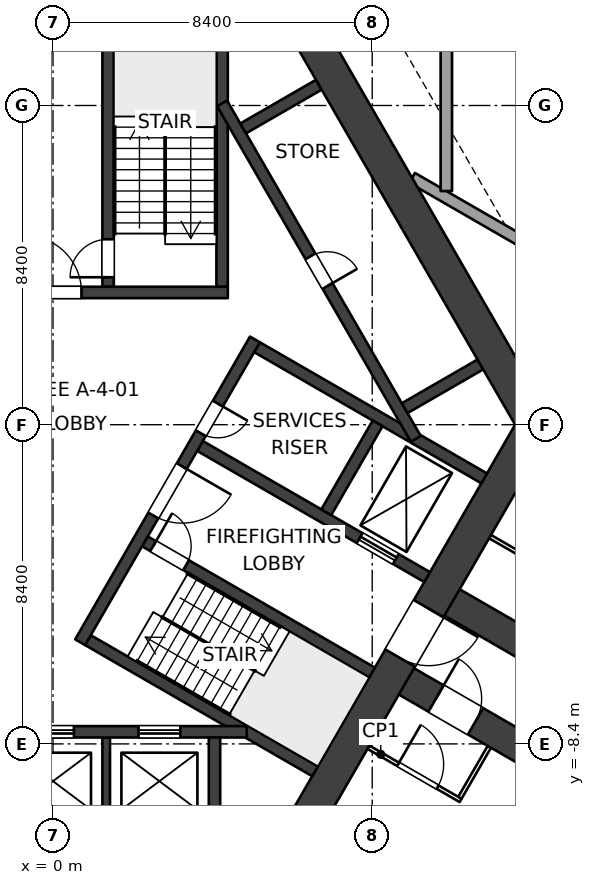
"""IFC4 building model, lengths in metres.
Left out: names, types, materials, properties, quantities, classifications, styles, units other than length and angle.
Written with IfcOpenShell. Run it as: python <this file> out.ifc"""

import sys

from ifc_helpers import new_model, si_unit, direction, frame, frame_2d, origin, place, context, subcontext, project, spatial, polyline, rectangle, outline, extrude, element, fill, save


model = new_model("IFC4")
c1 = context("Model", 3, precision=1e-05, world=origin(), true_north=direction((0.0, 1.0)))
c2 = subcontext(c1, "Body", "Model", "MODEL_VIEW")
j1 = project(units=[si_unit("LENGTHUNIT", "METRE"), si_unit("PLANEANGLEUNIT", "RADIAN")], contexts=[c1])
p1 = place(None, origin())
s1 = spatial("IfcSite", under=j1, at=p1, CompositionType="ELEMENT")
p2 = place(p1, origin())
s2 = spatial("IfcBuilding", under=s1, at=p2, CompositionType="ELEMENT")
p3 = place(p2, frame((0.0, 0.0, -10.5)))
s3 = spatial("IfcBuildingStorey", under=s2, at=p3, CompositionType="ELEMENT", Elevation=-10.5)
p4 = place(p3, frame((12.551, -0.225, 0.0), z_axis=(0.0, 0.0, 1.0), x_axis=(-0.499997612506, -0.8660267822, 0.0)))
e1 = element("IfcWall", 1, at=p4, inside=s3, PredefinedType="SHEAR", context=c2, shape_type="SweptSolid", body=[
    extrude(rectangle(XDim=12.161, YDim=0.9, at=frame_2d((6.08, 0.0))), origin(), (0.0, 0.0, 1.0), 3.5),
])
p5 = place(p4, frame((5.33, 0.0, 0.0)))
e2 = element("IfcOpeningElement", 2, at=p5, cuts=e1, PredefinedType="OPENING", context=c2, shape_type="SweptSolid", body=[
    extrude(rectangle(XDim=1.5, YDim=2.1, at=frame_2d((0.75, 1.05))), frame((0.0, 0.46, 0.0), z_axis=(0.0, -1.0, 0.0), x_axis=(1.0, 0.0, 0.0)), (0.0, 0.0, 1.0), 0.92),
])
p6 = place(p3, origin())
e3 = element("IfcWall", 3, at=p6, inside=s3, PredefinedType="SHEAR", context=c2, shape_type="SweptSolid", body=[
    extrude(outline(polyline([(13.2, 0.0), (6.6, 11.432), (6.08, 11.432), (6.08, 10.531), (12.161, 0.0), (12.94, -0.45), (13.2, 0.0)])), origin(), (0.0, 0.0, 1.0), 3.5),
])
p7 = place(p3, frame((-4.6, 3.48, 0.0), z_axis=(0.0, 0.0, 1.0), x_axis=(1.0, 0.0, 0.0)))
e4 = element("IfcWall", 4, at=p7, inside=s3, PredefinedType="SHEAR", context=c2, shape_type="SweptSolid", body=[
    extrude(rectangle(XDim=9.2, YDim=0.3, at=frame_2d((4.6, 0.0))), origin(), (0.0, 0.0, 1.0), 3.5),
])
p8 = place(p7, frame((3.85, 0.0, 0.0)))
e5 = element("IfcOpeningElement", 5, at=p8, cuts=e4, PredefinedType="OPENING", context=c2, shape_type="SweptSolid", body=[
    extrude(rectangle(XDim=1.5, YDim=2.1, at=frame_2d((0.75, 1.05))), frame((0.0, 0.16, 0.0), z_axis=(0.0, -1.0, 0.0), x_axis=(1.0, 0.0, 0.0)), (0.0, 0.0, 1.0), 0.32),
])
p9 = place(p7, frame((1.95, 0.0, 0.0)))
e6 = element("IfcOpeningElement", 6, at=p9, cuts=e4, PredefinedType="OPENING", context=c2, shape_type="SweptSolid", body=[
    extrude(rectangle(XDim=0.9, YDim=2.1, at=frame_2d((0.45, 1.05))), frame((0.0, 0.16, 0.0), z_axis=(0.0, -1.0, 0.0), x_axis=(1.0, 0.0, 0.0)), (0.0, 0.0, 1.0), 0.32),
])
p10 = place(p3, frame((1.45, 3.63, 0.0), z_axis=(0.0, 0.0, 1.0), x_axis=(0.0, 1.0, 0.0)))
e7 = element("IfcWall", 7, at=p10, inside=s3, PredefinedType="SHEAR", context=c2, shape_type="SweptSolid", body=[
    extrude(rectangle(XDim=6.902, YDim=0.3, at=frame_2d((3.451, 0.0))), origin(), (0.0, 0.0, 1.0), 3.5),
])
p11 = place(p10, frame((0.25, 0.0, 0.0)))
e8 = element("IfcOpeningElement", 8, at=p11, cuts=e7, PredefinedType="OPENING", context=c2, shape_type="SweptSolid", body=[
    extrude(rectangle(XDim=1.0, YDim=2.1, at=frame_2d((0.5, 1.05))), frame((0.0, 0.16, 0.0), z_axis=(0.0, -1.0, 0.0), x_axis=(1.0, 0.0, 0.0)), (0.0, 0.0, 1.0), 0.32),
])
p12 = place(p3, frame((4.45, 3.63, 0.0), z_axis=(0.0, 0.0, 1.0), x_axis=(0.0, 1.0, 0.0)))
e9 = element("IfcWall", 9, at=p12, inside=s3, PredefinedType="SHEAR", context=c2, shape_type="SweptSolid", body=[
    extrude(rectangle(XDim=6.902, YDim=0.3, at=frame_2d((3.451, 0.0))), origin(), (0.0, 0.0, 1.0), 3.5),
])
p13 = place(p3, frame((5.314, 2.244, 0.0), z_axis=(0.0, 0.0, 1.0), x_axis=(-0.499995050369, -0.866028261437, 0.0)))
e10 = element("IfcWall", 10, at=p13, inside=s3, PredefinedType="SHEAR", context=c2, shape_type="SweptSolid", body=[
    extrude(rectangle(XDim=9.2, YDim=0.3, at=frame_2d((4.6, 0.0))), origin(), (0.0, 0.0, 1.0), 3.5),
])
p14 = place(p13, frame((3.85, 0.0, 0.0)))
e11 = element("IfcOpeningElement", 11, at=p14, cuts=e10, PredefinedType="OPENING", context=c2, shape_type="SweptSolid", body=[
    extrude(rectangle(XDim=1.5, YDim=2.1, at=frame_2d((0.75, 1.05))), frame((0.0, 0.16, 0.0), z_axis=(0.0, -1.0, 0.0), x_axis=(1.0, 0.0, 0.0)), (0.0, 0.0, 1.0), 0.32),
])
p15 = place(p13, frame((1.95, 0.0, 0.0)))
e12 = element("IfcOpeningElement", 12, at=p15, cuts=e10, PredefinedType="OPENING", context=c2, shape_type="SweptSolid", body=[
    extrude(rectangle(XDim=0.9, YDim=2.1, at=frame_2d((0.45, 1.05))), frame((0.0, 0.16, 0.0), z_axis=(0.0, -1.0, 0.0), x_axis=(1.0, 0.0, 0.0)), (0.0, 0.0, 1.0), 0.32),
])
p16 = place(p3, frame((2.419, -3.071, 0.0), z_axis=(0.0, 0.0, 1.0), x_axis=(0.86602711848, -0.499997030048, 0.0)))
e13 = element("IfcWall", 13, at=p16, inside=s3, PredefinedType="SHEAR", context=c2, shape_type="SweptSolid", body=[
    extrude(rectangle(XDim=6.901, YDim=0.3, at=frame_2d((3.451, 0.0))), origin(), (0.0, 0.0, 1.0), 3.5),
])
p17 = place(p16, frame((0.25, 0.0, 0.0)))
e14 = element("IfcOpeningElement", 14, at=p17, cuts=e13, PredefinedType="OPENING", context=c2, shape_type="SweptSolid", body=[
    extrude(rectangle(XDim=1.0, YDim=2.1, at=frame_2d((0.5, 1.05))), frame((0.0, 0.16, 0.0), z_axis=(0.0, -1.0, 0.0), x_axis=(1.0, 0.0, 0.0)), (0.0, 0.0, 1.0), 0.32),
])
p18 = place(p3, frame((0.919, -5.669, 0.0), z_axis=(0.0, 0.0, 1.0), x_axis=(0.866011800373, -0.500023561059, 0.0)))
e15 = element("IfcWall", 15, at=p18, inside=s3, PredefinedType="SHEAR", context=c2, shape_type="SweptSolid", body=[
    extrude(rectangle(XDim=6.902, YDim=0.3, at=frame_2d((3.451, 0.0))), origin(), (0.0, 0.0, 1.0), 3.5),
])
p19 = place(p3, frame((3.869, -0.559, 0.0), z_axis=(0.0, 0.0, 1.0), x_axis=(0.86602711848, -0.499997030048, 0.0)))
e16 = element("IfcWall", 16, at=p19, inside=s3, PredefinedType="SHEAR", context=c2, shape_type="SweptSolid", body=[
    extrude(rectangle(XDim=6.901, YDim=0.3, at=frame_2d((3.451, 0.0))), origin(), (0.0, 0.0, 1.0), 3.5),
])
p20 = place(p19, frame((4.85, 0.0, 0.0)))
e17 = element("IfcOpeningElement", 17, at=p20, cuts=e16, PredefinedType="OPENING", context=c2, shape_type="SweptSolid", body=[
    extrude(rectangle(XDim=1.1, YDim=2.1, at=frame_2d((0.55, 1.05))), frame((0.0, 0.16, 0.0), z_axis=(0.0, -1.0, 0.0), x_axis=(1.0, 0.0, 0.0)), (0.0, 0.0, 1.0), 0.32),
])
p21 = place(p3, frame((5.369, 2.039, 0.0), z_axis=(0.0, 0.0, 1.0), x_axis=(0.86602711848, -0.499997030048, 0.0)))
e18 = element("IfcWall", 18, at=p21, inside=s3, PredefinedType="SHEAR", context=c2, shape_type="SweptSolid", body=[
    extrude(rectangle(XDim=6.901, YDim=0.3, at=frame_2d((3.451, 0.0))), origin(), (0.0, 0.0, 1.0), 3.5),
])
p22 = place(p3, frame((8.541, 0.034, 0.0), z_axis=(0.0, 0.0, 1.0), x_axis=(-0.50000943426, -0.866019956843, 0.0)))
e19 = element("IfcWall", 19, at=p22, inside=s3, PredefinedType="SHEAR", context=c2, shape_type="SweptSolid", body=[
    extrude(rectangle(XDim=2.7, YDim=0.3, at=frame_2d((1.35, 0.0))), origin(), (0.0, 0.0, 1.0), 3.5),
])
p23 = place(p3, frame((5.098, -8.082, 0.0), z_axis=(0.0, 0.0, 1.0), x_axis=(-1.0, 0.0, 0.0)))
e20 = element("IfcWall", 20, at=p23, inside=s3, PredefinedType="SHEAR", context=c2, shape_type="SweptSolid", body=[
    extrude(rectangle(XDim=10.195, YDim=0.3, at=frame_2d((5.098, 0.0))), origin(), (0.0, 0.0, 1.0), 3.5),
])
p24 = place(p23, frame((1.748, 0.0, 0.0)))
e21 = element("IfcOpeningElement", 21, at=p24, cuts=e20, PredefinedType="OPENING", context=c2, shape_type="SweptSolid", body=[
    extrude(rectangle(XDim=1.1, YDim=2.1, at=frame_2d((0.55, 1.05))), frame((0.0, 0.16, 0.0), z_axis=(0.0, -1.0, 0.0), x_axis=(1.0, 0.0, 0.0)), (0.0, 0.0, 1.0), 0.32),
])
p25 = place(p23, frame((4.548, 0.0, 0.0)))
e22 = element("IfcOpeningElement", 22, at=p25, cuts=e20, PredefinedType="OPENING", context=c2, shape_type="SweptSolid", body=[
    extrude(rectangle(XDim=1.1, YDim=2.1, at=frame_2d((0.55, 1.05))), frame((0.0, 0.16, 0.0), z_axis=(0.0, -1.0, 0.0), x_axis=(1.0, 0.0, 0.0)), (0.0, 0.0, 1.0), 0.32),
])
p26 = place(p23, frame((7.348, 0.0, 0.0)))
e23 = element("IfcOpeningElement", 23, at=p26, cuts=e20, PredefinedType="OPENING", context=c2, shape_type="SweptSolid", body=[
    extrude(rectangle(XDim=1.1, YDim=2.1, at=frame_2d((0.55, 1.05))), frame((0.0, 0.16, 0.0), z_axis=(0.0, -1.0, 0.0), x_axis=(1.0, 0.0, 0.0)), (0.0, 0.0, 1.0), 0.32),
])
p27 = place(p3, frame((4.25, -8.231, 0.0), z_axis=(0.0, 0.0, 1.0), x_axis=(0.0, -1.0, 0.0)))
e24 = element("IfcWall", 24, at=p27, inside=s3, PredefinedType="SHEAR", context=c2, shape_type="SweptSolid", body=[
    extrude(rectangle(XDim=2.3, YDim=0.3, at=frame_2d((1.15, 0.0))), origin(), (0.0, 0.0, 1.0), 3.5),
])
p28 = place(p3, frame((1.4, -8.231, 0.0), z_axis=(0.0, 0.0, 1.0), x_axis=(0.0, -1.0, 0.0)))
e25 = element("IfcWall", 25, at=p28, inside=s3, PredefinedType="SHEAR", context=c2, shape_type="SweptSolid", body=[
    extrude(rectangle(XDim=2.3, YDim=0.2, at=frame_2d((1.15, 0.0))), origin(), (0.0, 0.0, 1.0), 3.5),
])
p29 = place(p3, frame((4.45, 8.455, 0.0), z_axis=(0.0, 0.0, 1.0), x_axis=(0.500002290144, -0.866024081565, 0.0)))
e26 = element("IfcWall", 26, at=p29, inside=s3, PredefinedType="SHEAR", context=c2, shape_type="SweptSolid", body=[
    extrude(rectangle(XDim=10.195, YDim=0.3, at=frame_2d((5.098, 0.0))), origin(), (0.0, 0.0, 1.0), 3.5),
])
p30 = place(p29, frame((4.648, 0.0, 0.0)))
e27 = element("IfcOpeningElement", 27, at=p30, cuts=e26, PredefinedType="OPENING", context=c2, shape_type="SweptSolid", body=[
    extrude(rectangle(XDim=0.9, YDim=2.1, at=frame_2d((0.45, 1.05))), frame((0.0, 0.16, 0.0), z_axis=(0.0, -1.0, 0.0), x_axis=(1.0, 0.0, 0.0)), (0.0, 0.0, 1.0), 0.32),
])
for number, where, z_axis, x_axis in (
    (28, (5.004, 7.796, 0.0), (0.0, 0.0, 1.0), (0.866, 0.5, 0.0)),
    (29, (9.254, 0.435, 0.0), (0.0, 0.0, 1.0), (0.866, 0.5, 0.0)),
):
    element("IfcWall", number, at=place(p3, frame(where, z_axis=z_axis, x_axis=x_axis)), inside=s3, PredefinedType="SHEAR", context=c2, shape_type="SweptSolid", body=[
        extrude(rectangle(XDim=2.3, YDim=0.3, at=frame_2d((1.15, 0.0))), origin(), (0.0, 0.0, 1.0), 3.5),
    ])
p31 = place(p3, frame((10.11, -4.451, 0.0), z_axis=(0.0, 0.0, 1.0), x_axis=(0.866025284237, -0.500000207062, 0.0)))
e30 = element("IfcWall", 30, at=p31, inside=s3, PredefinedType="SHEAR", context=c2, shape_type="SweptSolid", body=[
    extrude(rectangle(XDim=36.75, YDim=0.8, at=frame_2d((18.375, 0.0))), origin(), (0.0, 0.0, 1.0), 3.5),
])
p32 = place(p31, frame((2.75, 0.0, 0.0)))
e31 = element("IfcOpeningElement", 31, at=p32, cuts=e30, PredefinedType="OPENING", context=c2, shape_type="SweptSolid", body=[
    extrude(rectangle(XDim=1.2, YDim=2.1, at=frame_2d((0.6, 1.05))), frame((0.0, 0.41, 0.0), z_axis=(0.0, -1.0, 0.0), x_axis=(1.0, 0.0, 0.0)), (0.0, 0.0, 1.0), 0.82),
])
p33 = place(p31, frame((7.35, 0.0, 0.0)))
e32 = element("IfcOpeningElement", 32, at=p33, cuts=e30, PredefinedType="OPENING", context=c2, shape_type="SweptSolid", body=[
    extrude(rectangle(XDim=1.2, YDim=2.1, at=frame_2d((0.6, 1.05))), frame((0.0, 0.41, 0.0), z_axis=(0.0, -1.0, 0.0), x_axis=(1.0, 0.0, 0.0)), (0.0, 0.0, 1.0), 0.82),
])
p34 = place(p3, frame((8.91, -6.53, 0.0), z_axis=(0.0, 0.0, 1.0), x_axis=(0.866025284237, -0.500000207062, 0.0)))
e33 = element("IfcWall", 33, at=p34, inside=s3, PredefinedType="SHEAR", context=c2, shape_type="SweptSolid", body=[
    extrude(rectangle(XDim=36.75, YDim=0.8, at=frame_2d((18.375, 0.0))), origin(), (0.0, 0.0, 1.0), 3.5),
])
p35 = place(p34, frame((1.35, 0.0, 0.0)))
e34 = element("IfcOpeningElement", 34, at=p35, cuts=e33, PredefinedType="OPENING", context=c2, shape_type="SweptSolid", body=[
    extrude(rectangle(XDim=1.2, YDim=2.1, at=frame_2d((0.6, 1.05))), frame((0.0, 0.41, 0.0), z_axis=(0.0, -1.0, 0.0), x_axis=(1.0, 0.0, 0.0)), (0.0, 0.0, 1.0), 0.82),
])
p36 = place(p3, frame((11.5, -2.945, 0.0), z_axis=(0.0, 0.0, 1.0), x_axis=(0.866045472092, -0.499965239061, 0.0)))
e35 = element("IfcWall", 35, at=p36, inside=s3, PredefinedType="PARTITIONING", context=c2, shape_type="SweptSolid", body=[
    extrude(rectangle(XDim=5.6, YDim=0.1, at=frame_2d((2.8, 0.0))), origin(), (0.0, 0.0, 1.0), 3.2),
])
p37 = place(p36, frame((1.125, 0.0, 0.0)))
e36 = element("IfcOpeningElement", 36, at=p37, cuts=e35, PredefinedType="OPENING", context=c2, shape_type="SweptSolid", body=[
    extrude(rectangle(XDim=0.9, YDim=2.1, at=frame_2d((0.45, 1.05))), frame((0.0, 0.06, 0.0), z_axis=(0.0, -1.0, 0.0), x_axis=(1.0, 0.0, 0.0)), (0.0, 0.0, 1.0), 0.12),
])
p38 = place(p36, frame((3.775, 0.0, 0.0)))
e37 = element("IfcOpeningElement", 37, at=p38, cuts=e35, PredefinedType="OPENING", context=c2, shape_type="SweptSolid", body=[
    extrude(rectangle(XDim=0.9, YDim=2.1, at=frame_2d((0.45, 1.05))), frame((0.0, 0.06, 0.0), z_axis=(0.0, -1.0, 0.0), x_axis=(1.0, 0.0, 0.0)), (0.0, 0.0, 1.0), 0.12),
])
p39 = place(p3, frame((8.3, -8.487, 0.0), z_axis=(0.0, 0.0, 1.0), x_axis=(0.866034573852, -0.49998411664, 0.0)))
e38 = element("IfcWall", 38, at=p39, inside=s3, PredefinedType="PARTITIONING", context=c2, shape_type="SweptSolid", body=[
    extrude(rectangle(XDim=2.8, YDim=0.1, at=frame_2d((1.4, 0.0))), origin(), (0.0, 0.0, 1.0), 3.2),
])
p40 = place(p39, frame((0.9, 0.0, 0.0)))
e39 = element("IfcOpeningElement", 39, at=p40, cuts=e38, PredefinedType="OPENING", context=c2, shape_type="SweptSolid", body=[
    extrude(rectangle(XDim=1.2, YDim=2.1, at=frame_2d((0.6, 1.05))), frame((0.0, 0.06, 0.0), z_axis=(0.0, -1.0, 0.0), x_axis=(1.0, 0.0, 0.0)), (0.0, 0.0, 1.0), 0.12),
])
p41 = place(p3, frame((11.482, -8.476, 0.0), z_axis=(0.0, 0.0, 1.0), x_axis=(-0.500017819788, -0.86601511528, 0.0)))
e40 = element("IfcWall", 40, at=p41, inside=s3, PredefinedType="PARTITIONING", context=c2, shape_type="SweptSolid", body=[
    extrude(rectangle(XDim=1.55, YDim=0.1, at=frame_2d((0.775, 0.0))), origin(), (0.0, 0.0, 1.0), 3.2),
])
p42 = place(p3, frame((10.35, 6.149, 0.0), z_axis=(0.0, 0.0, 1.0), x_axis=(0.0, 1.0, 0.0)))
e41 = element("IfcWall", 41, at=p42, inside=s3, PredefinedType="SOLIDWALL", context=c2, shape_type="SweptSolid", body=[
    extrude(rectangle(XDim=41.883, YDim=0.3, at=frame_2d((20.941, 0.0))), origin(), (0.0, 0.0, 1.0), 3.2),
])
p43 = place(p42, frame((25.383, 0.0, 0.0)))
e42 = element("IfcOpeningElement", 42, at=p43, cuts=e41, PredefinedType="OPENING", context=c2, shape_type="SweptSolid", body=[
    extrude(rectangle(XDim=1.8, YDim=2.4, at=frame_2d((0.9, 1.2))), frame((0.0, 0.16, 0.0), z_axis=(0.0, -1.0, 0.0), x_axis=(1.0, 0.0, 0.0)), (0.0, 0.0, 1.0), 0.32),
])
p44 = place(p3, frame((9.45, 6.495, 0.0), z_axis=(0.0, 0.0, 1.0), x_axis=(0.866025301493, -0.500000177174, 0.0)))
e43 = element("IfcWall", 43, at=p44, inside=s3, PredefinedType="SOLIDWALL", context=c2, shape_type="SweptSolid", body=[
    extrude(rectangle(XDim=43.095, YDim=0.3, at=frame_2d((21.548, 0.0))), origin(), (0.0, 0.0, 1.0), 3.2),
])
p45 = place(p44, frame((26.595, 0.0, 0.0)))
e44 = element("IfcOpeningElement", 44, at=p45, cuts=e43, PredefinedType="OPENING", context=c2, shape_type="SweptSolid", body=[
    extrude(rectangle(XDim=1.8, YDim=2.4, at=frame_2d((0.9, 1.2))), frame((0.0, 0.16, 0.0), z_axis=(0.0, -1.0, 0.0), x_axis=(1.0, 0.0, 0.0)), (0.0, 0.0, 1.0), 0.32),
])
p46 = place(p24, origin())
e45 = element("IfcDoor", 45, at=p46, inside=s3, OperationType="DOUBLE_DOOR_SLIDING", PredefinedType="DOOR", context=c2, shape_type="SweptSolid", body=[
    extrude(rectangle(XDim=1.1, YDim=2.1, at=frame_2d((0.55, 1.05))), frame((0.0, 0.025, 0.0), z_axis=(0.0, -1.0, 0.0), x_axis=(1.0, 0.0, 0.0)), (0.0, 0.0, 1.0), 0.05),
])
fill(e21, e45)
p47 = place(p25, origin())
e46 = element("IfcDoor", 46, at=p47, inside=s3, OperationType="DOUBLE_DOOR_SLIDING", PredefinedType="DOOR", context=c2, shape_type="SweptSolid", body=[
    extrude(rectangle(XDim=1.1, YDim=2.1, at=frame_2d((0.55, 1.05))), frame((0.0, 0.025, 0.0), z_axis=(0.0, -1.0, 0.0), x_axis=(1.0, 0.0, 0.0)), (0.0, 0.0, 1.0), 0.05),
])
fill(e22, e46)
p48 = place(p20, origin())
e47 = element("IfcDoor", 47, at=p48, inside=s3, OperationType="DOUBLE_DOOR_SLIDING", PredefinedType="DOOR", context=c2, shape_type="SweptSolid", body=[
    extrude(rectangle(XDim=1.1, YDim=2.1, at=frame_2d((0.55, 1.05))), frame((0.0, 0.025, 0.0), z_axis=(0.0, -1.0, 0.0), x_axis=(1.0, 0.0, 0.0)), (0.0, 0.0, 1.0), 0.05),
])
fill(e17, e47)
p49 = place(p8, origin())
e48 = element("IfcDoor", 48, at=p49, inside=s3, OperationType="DOUBLE_DOOR_DOUBLE_SWING", PredefinedType="DOOR", context=c2, shape_type="SweptSolid", body=[
    extrude(rectangle(XDim=1.5, YDim=2.1, at=frame_2d((0.75, 1.05))), frame((0.0, 0.025, 0.0), z_axis=(0.0, -1.0, 0.0), x_axis=(1.0, 0.0, 0.0)), (0.0, 0.0, 1.0), 0.05),
])
fill(e5, e48)
p50 = place(p11, origin())
e49 = element("IfcDoor", 49, at=p50, inside=s3, OperationType="SINGLE_SWING_LEFT", PredefinedType="DOOR", context=c2, shape_type="SweptSolid", body=[
    extrude(rectangle(XDim=1.0, YDim=2.1, at=frame_2d((0.5, 1.05))), frame((0.0, 0.025, 0.0), z_axis=(0.0, -1.0, 0.0), x_axis=(1.0, 0.0, 0.0)), (0.0, 0.0, 1.0), 0.05),
])
fill(e8, e49)
p51 = place(p14, origin())
e50 = element("IfcDoor", 50, at=p51, inside=s3, OperationType="DOUBLE_DOOR_DOUBLE_SWING", PredefinedType="DOOR", context=c2, shape_type="SweptSolid", body=[
    extrude(rectangle(XDim=1.5, YDim=2.1, at=frame_2d((0.75, 1.05))), frame((0.0, 0.025, 0.0), z_axis=(0.0, -1.0, 0.0), x_axis=(1.0, 0.0, 0.0)), (0.0, 0.0, 1.0), 0.05),
])
fill(e11, e50)
p52 = place(p15, origin())
e51 = element("IfcDoor", 51, at=p52, inside=s3, OperationType="SINGLE_SWING_LEFT", PredefinedType="DOOR", context=c2, shape_type="SweptSolid", body=[
    extrude(rectangle(XDim=0.9, YDim=2.1, at=frame_2d((0.45, 1.05))), frame((0.0, 0.025, 0.0), z_axis=(0.0, -1.0, 0.0), x_axis=(1.0, 0.0, 0.0)), (0.0, 0.0, 1.0), 0.05),
])
fill(e12, e51)
p53 = place(p17, origin())
e52 = element("IfcDoor", 52, at=p53, inside=s3, OperationType="SINGLE_SWING_LEFT", PredefinedType="DOOR", context=c2, shape_type="SweptSolid", body=[
    extrude(rectangle(XDim=1.0, YDim=2.1, at=frame_2d((0.5, 1.05))), frame((0.0, 0.025, 0.0), z_axis=(0.0, -1.0, 0.0), x_axis=(1.0, 0.0, 0.0)), (0.0, 0.0, 1.0), 0.05),
])
fill(e14, e52)
p54 = place(p5, origin())
e53 = element("IfcDoor", 53, at=p54, inside=s3, OperationType="DOUBLE_DOOR_DOUBLE_SWING", PredefinedType="DOOR", context=c2, shape_type="SweptSolid", body=[
    extrude(rectangle(XDim=1.5, YDim=2.1, at=frame_2d((0.75, 1.05))), frame((0.0, 0.025, 0.0), z_axis=(0.0, -1.0, 0.0), x_axis=(1.0, 0.0, 0.0)), (0.0, 0.0, 1.0), 0.05),
])
fill(e2, e53)
p55 = place(p30, origin())
e54 = element("IfcDoor", 54, at=p55, inside=s3, OperationType="SINGLE_SWING_RIGHT", PredefinedType="DOOR", context=c2, shape_type="SweptSolid", body=[
    extrude(rectangle(XDim=0.9, YDim=2.1, at=frame_2d((0.45, 1.05))), frame((0.0, 0.025, 0.0), z_axis=(0.0, -1.0, 0.0), x_axis=(1.0, 0.0, 0.0)), (0.0, 0.0, 1.0), 0.05),
])
fill(e27, e54)
p56 = place(p35, origin())
e55 = element("IfcDoor", 55, at=p56, inside=s3, OperationType="DOUBLE_SWING_LEFT", PredefinedType="DOOR", context=c2, shape_type="SweptSolid", body=[
    extrude(rectangle(XDim=1.2, YDim=2.1, at=frame_2d((0.6, 1.05))), frame((0.0, 0.025, 0.0), z_axis=(0.0, -1.0, 0.0), x_axis=(1.0, 0.0, 0.0)), (0.0, 0.0, 1.0), 0.05),
])
fill(e34, e55)
p57 = place(p40, origin())
e56 = element("IfcDoor", 56, at=p57, inside=s3, OperationType="DOUBLE_SWING_LEFT", PredefinedType="DOOR", context=c2, shape_type="SweptSolid", body=[
    extrude(rectangle(XDim=1.2, YDim=2.1, at=frame_2d((0.6, 1.05))), frame((0.0, 0.025, 0.0), z_axis=(0.0, -1.0, 0.0), x_axis=(1.0, 0.0, 0.0)), (0.0, 0.0, 1.0), 0.05),
])
fill(e39, e56)
save(model, sys.argv[1])
